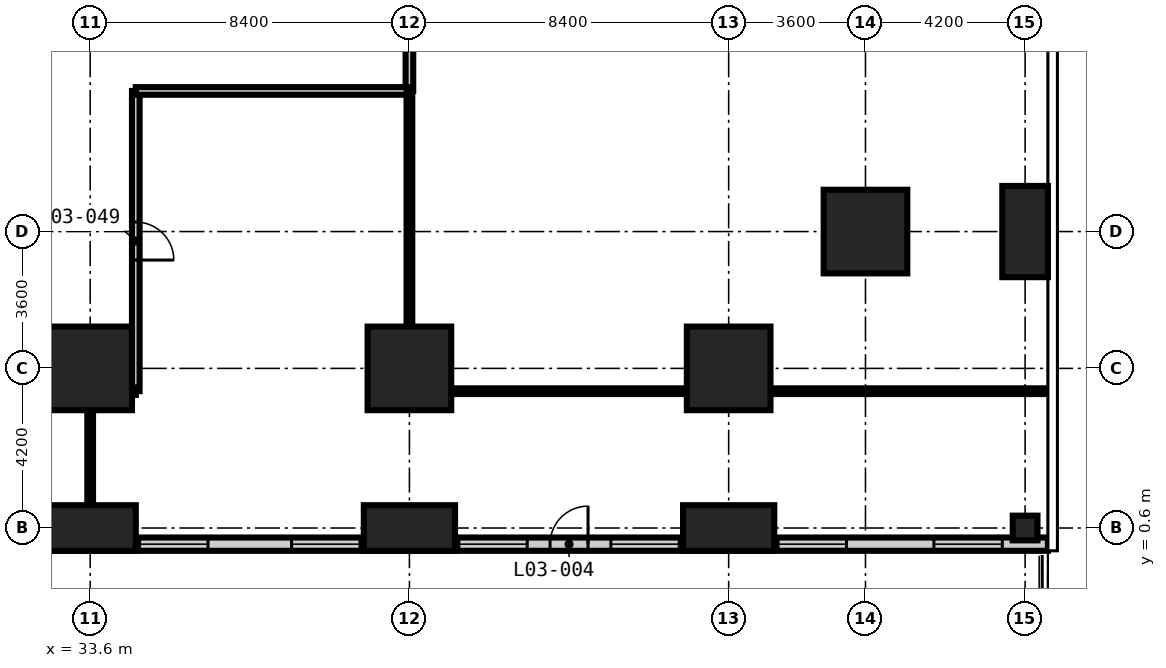
"""IFC4 building model, lengths in metres.
Left out: names, types, materials, properties, quantities, classifications, styles, units other than length and angle.
Written with IfcOpenShell. Run it as: python <this file> out.ifc"""

import sys

from ifc_helpers import new_model, si_unit, direction, frame, frame_2d, origin, origin_2d, place, context, subcontext, project, spatial, rectangle, extrude, element, fill, save


model = new_model("IFC4")
c1 = context("Model", 3, precision=1e-05, world=origin(), true_north=direction((0.0, 1.0)))
c2 = subcontext(c1, "Body", "Model", "MODEL_VIEW")
j1 = project(units=[si_unit("LENGTHUNIT", "METRE"), si_unit("PLANEANGLEUNIT", "RADIAN")], contexts=[c1])
p1 = place(None, origin())
s1 = spatial("IfcSite", under=j1, at=p1, CompositionType="ELEMENT")
p2 = place(p1, origin())
s2 = spatial("IfcBuilding", under=s1, at=p2, CompositionType="ELEMENT")
p3 = place(p2, frame((0.0, 0.0, 17.0)))
s3 = spatial("IfcBuildingStorey", under=s2, at=p3, CompositionType="ELEMENT", Elevation=17.0)
p4 = place(p3, frame((33.6, 0.6, -0.3), z_axis=(0.0, 0.0, 1.0), x_axis=(1.0, 0.0, 0.0)))
e1 = element("IfcColumn", 1, at=p4, inside=s3, PredefinedType="COLUMN", context=c2, shape_type="SweptSolid", body=[
    extrude(rectangle(XDim=2.4, YDim=1.2, at=origin_2d()), origin(), (0.0, 0.0, 1.0), 4.95),
])
p5 = place(p3, frame((33.6, 4.8, -0.3), z_axis=(0.0, 0.0, 1.0), x_axis=(1.0, 0.0, 0.0)))
e2 = element("IfcColumn", 2, at=p5, inside=s3, PredefinedType="COLUMN", context=c2, shape_type="SweptSolid", body=[
    extrude(rectangle(XDim=2.2, YDim=2.2, at=origin_2d()), origin(), (0.0, 0.0, 1.0), 4.95),
])
p6 = place(p3, frame((42.0, 0.6, -0.3), z_axis=(0.0, 0.0, 1.0), x_axis=(1.0, 0.0, 0.0)))
e3 = element("IfcColumn", 3, at=p6, inside=s3, PredefinedType="COLUMN", context=c2, shape_type="SweptSolid", body=[
    extrude(rectangle(XDim=2.4, YDim=1.2, at=origin_2d()), origin(), (0.0, 0.0, 1.0), 4.95),
])
p7 = place(p3, frame((42.0, 4.8, -0.3), z_axis=(0.0, 0.0, 1.0), x_axis=(1.0, 0.0, 0.0)))
e4 = element("IfcColumn", 4, at=p7, inside=s3, PredefinedType="COLUMN", context=c2, shape_type="SweptSolid", body=[
    extrude(rectangle(XDim=2.2, YDim=2.2, at=origin_2d()), origin(), (0.0, 0.0, 1.0), 4.95),
])
p8 = place(p3, frame((50.4, 0.6, -0.3), z_axis=(0.0, 0.0, 1.0), x_axis=(1.0, 0.0, 0.0)))
e5 = element("IfcColumn", 5, at=p8, inside=s3, PredefinedType="COLUMN", context=c2, shape_type="SweptSolid", body=[
    extrude(rectangle(XDim=2.4, YDim=1.2, at=origin_2d()), origin(), (0.0, 0.0, 1.0), 4.95),
])
for number, where, z_axis, x_axis in (
    (6, (50.4, 4.8, -0.3), (0.0, 0.0, 1.0), (1.0, 0.0, 0.0)),
    (7, (54.0, 8.4, -0.3), (0.0, 0.0, 1.0), (1.0, 0.0, 0.0)),
):
    element("IfcColumn", number, at=place(p3, frame(where, z_axis=z_axis, x_axis=x_axis)), inside=s3, PredefinedType="COLUMN", context=c2, shape_type="SweptSolid", body=[
        extrude(rectangle(XDim=2.2, YDim=2.2, at=origin_2d()), origin(), (0.0, 0.0, 1.0), 4.95),
    ])
p9 = place(p3, frame((58.2, 8.4, -0.3), z_axis=(0.0, 0.0, 1.0), x_axis=(1.0, 0.0, 0.0)))
e8 = element("IfcColumn", 8, at=p9, inside=s3, PredefinedType="COLUMN", context=c2, shape_type="SweptSolid", body=[
    extrude(rectangle(XDim=1.2, YDim=2.4, at=origin_2d()), origin(), (0.0, 0.0, 1.0), 4.95),
])
p10 = place(p3, frame((58.2, 0.6, -0.3), z_axis=(0.0, 0.0, 1.0), x_axis=(1.0, 0.0, 0.0)))
e9 = element("IfcColumn", 9, at=p10, inside=s3, PredefinedType="COLUMN", context=c2, shape_type="SweptSolid", body=[
    extrude(rectangle(XDim=0.65, YDim=0.65, at=origin_2d()), origin(), (0.0, 0.0, 1.0), 4.95),
])
p11 = place(p3, frame((-9.0, 0.175, 0.0), z_axis=(0.0, 0.0, 1.0), x_axis=(1.0, 0.0, 0.0)))
e10 = element("IfcWall", 10, at=p11, inside=s3, PredefinedType="SOLIDWALL", context=c2, shape_type="SweptSolid", body=[
    extrude(rectangle(XDim=67.8, YDim=0.35, at=frame_2d((33.9, 0.0))), origin(), (0.0, 0.0, 1.0), 4.65),
])
p12 = place(p11, frame((7.1, 0.0, 0.0)))
e11 = element("IfcOpeningElement", 11, at=p12, cuts=e10, PredefinedType="OPENING", context=c2, shape_type="SweptSolid", body=[
    extrude(rectangle(XDim=1.0, YDim=2.4, at=frame_2d((0.5, 1.2))), frame((0.0, 0.185, 0.0), z_axis=(0.0, -1.0, 0.0), x_axis=(1.0, 0.0, 0.0)), (0.0, 0.0, 1.0), 0.37),
])
p13 = place(p11, frame((18.7, 0.0, 0.0)))
e12 = element("IfcOpeningElement", 12, at=p13, cuts=e10, PredefinedType="OPENING", context=c2, shape_type="SweptSolid", body=[
    extrude(rectangle(XDim=1.0, YDim=2.4, at=frame_2d((0.5, 1.2))), frame((0.0, 0.185, 0.0), z_axis=(0.0, -1.0, 0.0), x_axis=(1.0, 0.0, 0.0)), (0.0, 0.0, 1.0), 0.37),
])
p14 = place(p11, frame((10.2, 0.0, 0.6)))
e13 = element("IfcOpeningElement", 13, at=p14, cuts=e10, PredefinedType="OPENING", context=c2, shape_type="SweptSolid", body=[
    extrude(rectangle(XDim=1.8, YDim=2.1, at=frame_2d((0.9, 1.05))), frame((0.0, 0.185, 0.0), z_axis=(0.0, -1.0, 0.0), x_axis=(1.0, 0.0, 0.0)), (0.0, 0.0, 1.0), 0.37),
])
p15 = place(p11, frame((14.3, 0.0, 0.6)))
e14 = element("IfcOpeningElement", 14, at=p15, cuts=e10, PredefinedType="OPENING", context=c2, shape_type="SweptSolid", body=[
    extrude(rectangle(XDim=1.8, YDim=2.1, at=frame_2d((0.9, 1.05))), frame((0.0, 0.185, 0.0), z_axis=(0.0, -1.0, 0.0), x_axis=(1.0, 0.0, 0.0)), (0.0, 0.0, 1.0), 0.37),
])
p16 = place(p11, frame((22.7, 0.0, 0.6)))
e15 = element("IfcOpeningElement", 15, at=p16, cuts=e10, PredefinedType="OPENING", context=c2, shape_type="SweptSolid", body=[
    extrude(rectangle(XDim=1.8, YDim=2.1, at=frame_2d((0.9, 1.05))), frame((0.0, 0.185, 0.0), z_axis=(0.0, -1.0, 0.0), x_axis=(1.0, 0.0, 0.0)), (0.0, 0.0, 1.0), 0.37),
])
p17 = place(p11, frame((28.9, 0.0, 0.0)))
e16 = element("IfcOpeningElement", 16, at=p17, cuts=e10, PredefinedType="OPENING", context=c2, shape_type="SweptSolid", body=[
    extrude(rectangle(XDim=1.0, YDim=2.4, at=frame_2d((0.5, 1.2))), frame((0.0, 0.185, 0.0), z_axis=(0.0, -1.0, 0.0), x_axis=(1.0, 0.0, 0.0)), (0.0, 0.0, 1.0), 0.37),
])
p18 = place(p11, frame((30.6, 0.0, 0.6)))
e17 = element("IfcOpeningElement", 17, at=p18, cuts=e10, PredefinedType="OPENING", context=c2, shape_type="SweptSolid", body=[
    extrude(rectangle(XDim=1.8, YDim=2.1, at=frame_2d((0.9, 1.05))), frame((0.0, 0.185, 0.0), z_axis=(0.0, -1.0, 0.0), x_axis=(1.0, 0.0, 0.0)), (0.0, 0.0, 1.0), 0.37),
])
p19 = place(p11, frame((54.7, 0.0, 0.0)))
e18 = element("IfcOpeningElement", 18, at=p19, cuts=e10, PredefinedType="OPENING", context=c2, shape_type="SweptSolid", body=[
    extrude(rectangle(XDim=1.0, YDim=2.4, at=frame_2d((0.5, 1.2))), frame((0.0, 0.185, 0.0), z_axis=(0.0, -1.0, 0.0), x_axis=(1.0, 0.0, 0.0)), (0.0, 0.0, 1.0), 0.37),
])
p20 = place(p11, frame((43.9, 0.0, 0.6)))
e19 = element("IfcOpeningElement", 19, at=p20, cuts=e10, PredefinedType="OPENING", context=c2, shape_type="SweptSolid", body=[
    extrude(rectangle(XDim=1.8, YDim=2.1, at=frame_2d((0.9, 1.05))), frame((0.0, 0.185, 0.0), z_axis=(0.0, -1.0, 0.0), x_axis=(1.0, 0.0, 0.0)), (0.0, 0.0, 1.0), 0.37),
])
p21 = place(p11, frame((47.9, 0.0, 0.6)))
e20 = element("IfcOpeningElement", 20, at=p21, cuts=e10, PredefinedType="OPENING", context=c2, shape_type="SweptSolid", body=[
    extrude(rectangle(XDim=1.8, YDim=2.1, at=frame_2d((0.9, 1.05))), frame((0.0, 0.185, 0.0), z_axis=(0.0, -1.0, 0.0), x_axis=(1.0, 0.0, 0.0)), (0.0, 0.0, 1.0), 0.37),
])
p22 = place(p11, frame((52.3, 0.0, 0.6)))
e21 = element("IfcOpeningElement", 21, at=p22, cuts=e10, PredefinedType="OPENING", context=c2, shape_type="SweptSolid", body=[
    extrude(rectangle(XDim=1.8, YDim=2.1, at=frame_2d((0.9, 1.05))), frame((0.0, 0.185, 0.0), z_axis=(0.0, -1.0, 0.0), x_axis=(1.0, 0.0, 0.0)), (0.0, 0.0, 1.0), 0.37),
])
p23 = place(p11, frame((56.3, 0.0, 0.6)))
e22 = element("IfcOpeningElement", 22, at=p23, cuts=e10, PredefinedType="OPENING", context=c2, shape_type="SweptSolid", body=[
    extrude(rectangle(XDim=1.8, YDim=2.1, at=frame_2d((0.9, 1.05))), frame((0.0, 0.185, 0.0), z_axis=(0.0, -1.0, 0.0), x_axis=(1.0, 0.0, 0.0)), (0.0, 0.0, 1.0), 0.37),
])
p24 = place(p11, frame((60.7, 0.0, 0.6)))
e23 = element("IfcOpeningElement", 23, at=p24, cuts=e10, PredefinedType="OPENING", context=c2, shape_type="SweptSolid", body=[
    extrude(rectangle(XDim=1.8, YDim=2.1, at=frame_2d((0.9, 1.05))), frame((0.0, 0.185, 0.0), z_axis=(0.0, -1.0, 0.0), x_axis=(1.0, 0.0, 0.0)), (0.0, 0.0, 1.0), 0.37),
])
p25 = place(p11, frame((64.8, 0.0, 0.6)))
e24 = element("IfcOpeningElement", 24, at=p25, cuts=e10, PredefinedType="OPENING", context=c2, shape_type="SweptSolid", body=[
    extrude(rectangle(XDim=1.8, YDim=2.1, at=frame_2d((0.9, 1.05))), frame((0.0, 0.185, 0.0), z_axis=(0.0, -1.0, 0.0), x_axis=(1.0, 0.0, 0.0)), (0.0, 0.0, 1.0), 0.37),
])
p26 = place(p3, frame((34.8, 4.2, 0.0), z_axis=(0.0, 0.0, 1.0), x_axis=(0.0, 1.0, 0.0)))
e25 = element("IfcWall", 25, at=p26, inside=s3, PredefinedType="PARTITIONING", context=c2, shape_type="SweptSolid", body=[
    extrude(rectangle(XDim=7.9, YDim=0.2, at=frame_2d((3.95, 0.0))), origin(), (0.0, 0.0, 1.0), 4.65),
])
p27 = place(p26, frame((3.45, 0.0, 0.0)))
e26 = element("IfcOpeningElement", 26, at=p27, cuts=e25, PredefinedType="OPENING", context=c2, shape_type="SweptSolid", body=[
    extrude(rectangle(XDim=1.0, YDim=2.1, at=frame_2d((0.5, 1.05))), frame((0.0, 0.11, 0.0), z_axis=(0.0, -1.0, 0.0), x_axis=(1.0, 0.0, 0.0)), (0.0, 0.0, 1.0), 0.22),
])
p28 = place(p3, frame((42.0, 12.1, 0.0), z_axis=(0.0, 0.0, 1.0), x_axis=(0.0, 1.0, 0.0)))
e27 = element("IfcWall", 27, at=p28, inside=s3, PredefinedType="PARTITIONING", context=c2, shape_type="SweptSolid", body=[
    extrude(rectangle(XDim=3.2, YDim=0.2, at=frame_2d((1.6, 0.0))), origin(), (0.0, 0.0, 1.0), 4.65),
])
p29 = place(p3, frame((24.0, 4.2, 0.0), z_axis=(0.0, 0.0, 1.0), x_axis=(1.0, 0.0, 0.0)))
e28 = element("IfcWall", 28, at=p29, inside=s3, PredefinedType="PARTITIONING", context=c2, shape_type="SweptSolid", body=[
    extrude(rectangle(XDim=10.8, YDim=0.2, at=frame_2d((5.4, 0.0))), origin(), (0.0, 0.0, 1.0), 4.65),
])
p30 = place(p29, frame((2.35, 0.0, 0.0)))
e29 = element("IfcOpeningElement", 29, at=p30, cuts=e28, PredefinedType="OPENING", context=c2, shape_type="SweptSolid", body=[
    extrude(rectangle(XDim=0.9, YDim=2.1, at=frame_2d((0.45, 1.05))), frame((0.0, 0.11, 0.0), z_axis=(0.0, -1.0, 0.0), x_axis=(1.0, 0.0, 0.0)), (0.0, 0.0, 1.0), 0.22),
])
p31 = place(p29, frame((4.95, 0.0, 0.0)))
e30 = element("IfcOpeningElement", 30, at=p31, cuts=e28, PredefinedType="OPENING", context=c2, shape_type="SweptSolid", body=[
    extrude(rectangle(XDim=0.9, YDim=2.1, at=frame_2d((0.45, 1.05))), frame((0.0, 0.11, 0.0), z_axis=(0.0, -1.0, 0.0), x_axis=(1.0, 0.0, 0.0)), (0.0, 0.0, 1.0), 0.22),
])
p32 = place(p29, frame((7.4, 0.0, 0.0)))
e31 = element("IfcOpeningElement", 31, at=p32, cuts=e28, PredefinedType="OPENING", context=c2, shape_type="SweptSolid", body=[
    extrude(rectangle(XDim=1.0, YDim=2.1, at=frame_2d((0.5, 1.05))), frame((0.0, 0.11, 0.0), z_axis=(0.0, -1.0, 0.0), x_axis=(1.0, 0.0, 0.0)), (0.0, 0.0, 1.0), 0.22),
])
p33 = place(p3, frame((34.8, 12.1, 0.0), z_axis=(0.0, 0.0, 1.0), x_axis=(1.0, 0.0, 0.0)))
e32 = element("IfcWall", 32, at=p33, inside=s3, PredefinedType="PARTITIONING", context=c2, shape_type="SweptSolid", body=[
    extrude(rectangle(XDim=7.2, YDim=0.2, at=frame_2d((3.6, 0.0))), origin(), (0.0, 0.0, 1.0), 4.65),
])
p34 = place(p3, frame((33.6, 0.0, 0.0), z_axis=(0.0, 0.0, 1.0), x_axis=(0.0, 1.0, 0.0)))
e33 = element("IfcWall", 33, at=p34, inside=s3, PredefinedType="PARTITIONING", context=c2, shape_type="SweptSolid", body=[
    extrude(rectangle(XDim=4.2, YDim=0.15, at=frame_2d((2.1, 0.0))), origin(), (0.0, 0.0, 1.0), 4.65),
])
p35 = place(p3, frame((42.0, 4.2, 0.0), z_axis=(0.0, 0.0, 1.0), x_axis=(0.0, 1.0, 0.0)))
e34 = element("IfcWall", 34, at=p35, inside=s3, PredefinedType="PARTITIONING", context=c2, shape_type="SweptSolid", body=[
    extrude(rectangle(XDim=7.9, YDim=0.15, at=frame_2d((3.95, 0.0))), origin(), (0.0, 0.0, 1.0), 4.65),
])
p36 = place(p3, frame((42.0, 4.2, 0.0), z_axis=(0.0, 0.0, 1.0), x_axis=(1.0, 0.0, 0.0)))
e35 = element("IfcWall", 35, at=p36, inside=s3, PredefinedType="PARTITIONING", context=c2, shape_type="SweptSolid", body=[
    extrude(rectangle(XDim=16.8, YDim=0.15, at=frame_2d((8.4, 0.0))), origin(), (0.0, 0.0, 1.0), 4.65),
])
p37 = place(p19, origin())
e36 = element("IfcDoor", 36, at=p37, inside=s3, OperationType="SINGLE_SWING_RIGHT", PredefinedType="DOOR", context=c2, shape_type="SweptSolid", body=[
    extrude(rectangle(XDim=1.0, YDim=2.4, at=frame_2d((0.5, 1.2))), frame((0.0, 0.025, 0.0), z_axis=(0.0, -1.0, 0.0), x_axis=(1.0, 0.0, 0.0)), (0.0, 0.0, 1.0), 0.05),
])
fill(e18, e36)
p38 = place(p20, origin())
e37 = element("IfcWindow", 37, at=p38, inside=s3, PartitioningType="SINGLE_PANEL", PredefinedType="WINDOW", context=c2, shape_type="SweptSolid", body=[
    extrude(rectangle(XDim=1.8, YDim=2.1, at=frame_2d((0.9, 1.05))), frame((0.0, 0.03, 0.0), z_axis=(0.0, -1.0, 0.0), x_axis=(1.0, 0.0, 0.0)), (0.0, 0.0, 1.0), 0.06),
])
fill(e19, e37)
p39 = place(p21, origin())
e38 = element("IfcWindow", 38, at=p39, inside=s3, PartitioningType="SINGLE_PANEL", PredefinedType="WINDOW", context=c2, shape_type="SweptSolid", body=[
    extrude(rectangle(XDim=1.8, YDim=2.1, at=frame_2d((0.9, 1.05))), frame((0.0, 0.03, 0.0), z_axis=(0.0, -1.0, 0.0), x_axis=(1.0, 0.0, 0.0)), (0.0, 0.0, 1.0), 0.06),
])
fill(e20, e38)
p40 = place(p22, origin())
e39 = element("IfcWindow", 39, at=p40, inside=s3, PartitioningType="SINGLE_PANEL", PredefinedType="WINDOW", context=c2, shape_type="SweptSolid", body=[
    extrude(rectangle(XDim=1.8, YDim=2.1, at=frame_2d((0.9, 1.05))), frame((0.0, 0.03, 0.0), z_axis=(0.0, -1.0, 0.0), x_axis=(1.0, 0.0, 0.0)), (0.0, 0.0, 1.0), 0.06),
])
fill(e21, e39)
p41 = place(p23, origin())
e40 = element("IfcWindow", 40, at=p41, inside=s3, PartitioningType="SINGLE_PANEL", PredefinedType="WINDOW", context=c2, shape_type="SweptSolid", body=[
    extrude(rectangle(XDim=1.8, YDim=2.1, at=frame_2d((0.9, 1.05))), frame((0.0, 0.03, 0.0), z_axis=(0.0, -1.0, 0.0), x_axis=(1.0, 0.0, 0.0)), (0.0, 0.0, 1.0), 0.06),
])
fill(e22, e40)
p42 = place(p24, origin())
e41 = element("IfcWindow", 41, at=p42, inside=s3, PartitioningType="SINGLE_PANEL", PredefinedType="WINDOW", context=c2, shape_type="SweptSolid", body=[
    extrude(rectangle(XDim=1.8, YDim=2.1, at=frame_2d((0.9, 1.05))), frame((0.0, 0.03, 0.0), z_axis=(0.0, -1.0, 0.0), x_axis=(1.0, 0.0, 0.0)), (0.0, 0.0, 1.0), 0.06),
])
fill(e23, e41)
p43 = place(p25, origin())
e42 = element("IfcWindow", 42, at=p43, inside=s3, PartitioningType="SINGLE_PANEL", PredefinedType="WINDOW", context=c2, shape_type="SweptSolid", body=[
    extrude(rectangle(XDim=1.8, YDim=2.1, at=frame_2d((0.9, 1.05))), frame((0.0, 0.03, 0.0), z_axis=(0.0, -1.0, 0.0), x_axis=(1.0, 0.0, 0.0)), (0.0, 0.0, 1.0), 0.06),
])
fill(e24, e42)
p44 = place(p27, frame((1.0, 0.0, 0.0), z_axis=(0.0, 0.0, 1.0), x_axis=(-1.0, 0.0, 0.0)))
e43 = element("IfcDoor", 43, at=p44, inside=s3, OperationType="SINGLE_SWING_RIGHT", PredefinedType="DOOR", context=c2, shape_type="SweptSolid", body=[
    extrude(rectangle(XDim=1.0, YDim=2.1, at=frame_2d((0.5, 1.05))), frame((0.0, 0.025, 0.0), z_axis=(0.0, -1.0, 0.0), x_axis=(1.0, 0.0, 0.0)), (0.0, 0.0, 1.0), 0.05),
])
fill(e26, e43)
save(model, sys.argv[1])
